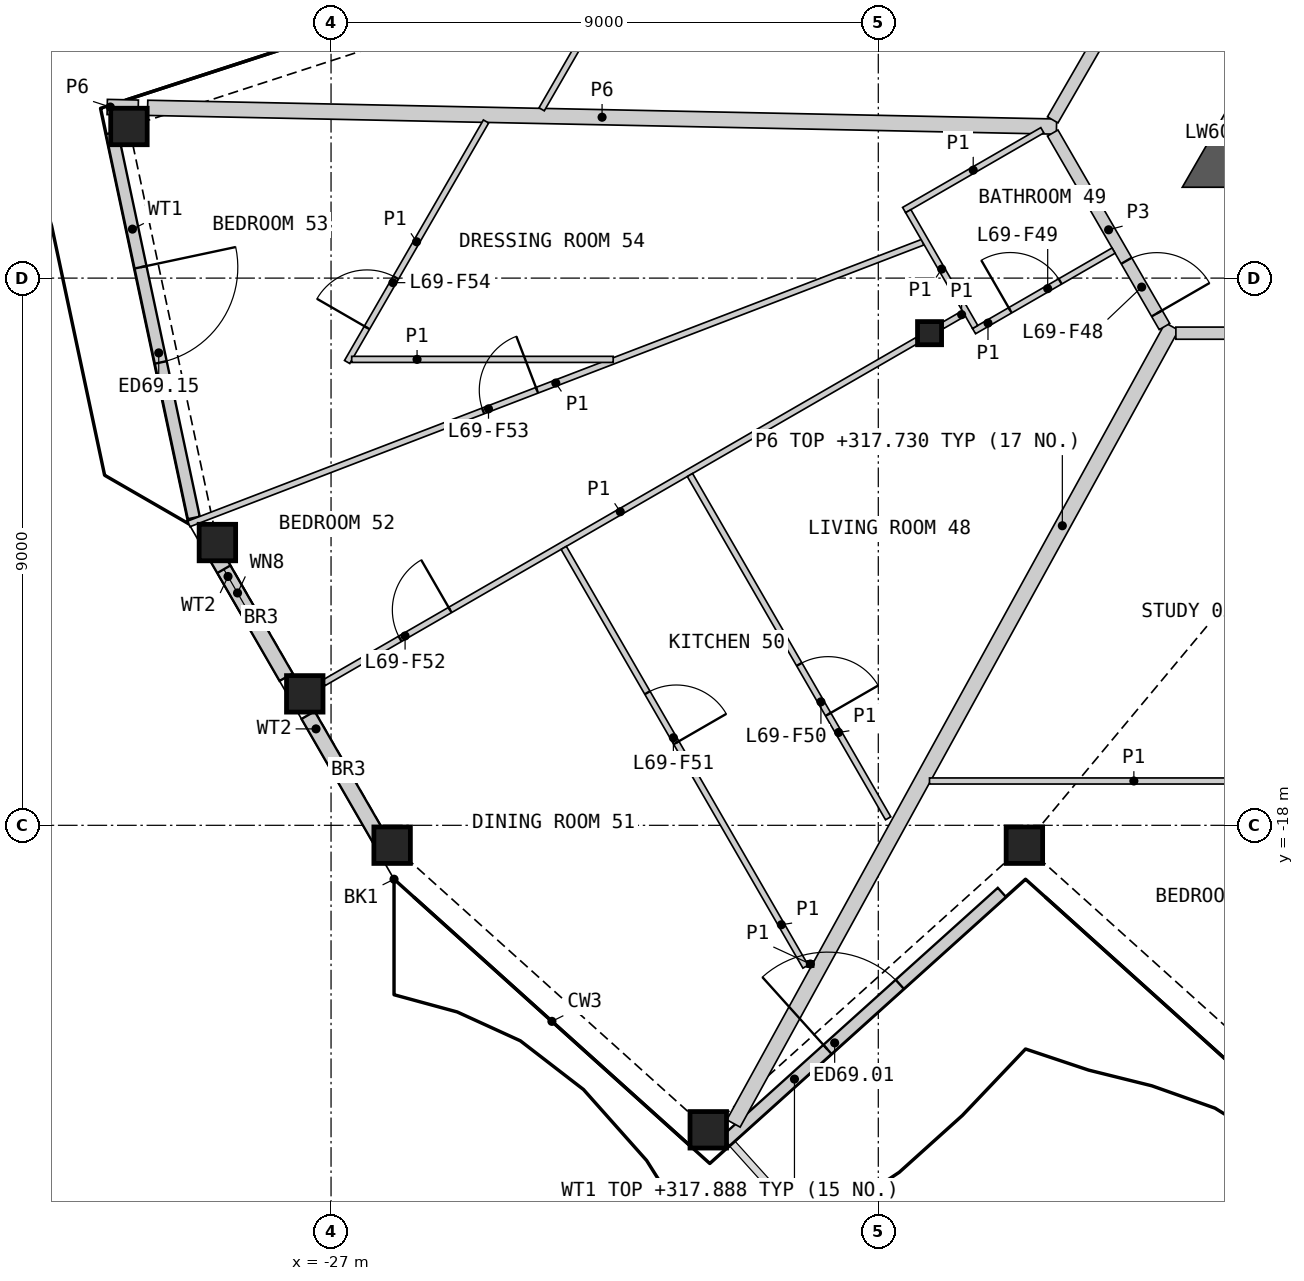
"""IFC4 building model, lengths in metres.
Left out: names, types, materials, properties, quantities, classifications, styles, units other than length and angle.
Written with IfcOpenShell. Run it as: python <this file> out.ifc"""

import sys

from ifc_helpers import new_model, si_unit, direction, frame, frame_2d, origin, origin_2d, place, context, subcontext, project, spatial, polyline, rectangle, hollow_rectangle, i_section, outline, extrude, element, fill, save


model = new_model("IFC4")
c1 = context("Model", 3, precision=1e-05, world=origin(), true_north=direction((0.0, 1.0)))
c2 = subcontext(c1, "Body", "Model", "MODEL_VIEW")
j1 = project(units=[si_unit("LENGTHUNIT", "METRE"), si_unit("PLANEANGLEUNIT", "RADIAN")], contexts=[c1])
p1 = place(None, origin())
s1 = spatial("IfcSite", under=j1, at=p1, CompositionType="ELEMENT")
p2 = place(p1, origin())
s2 = spatial("IfcBuilding", under=s1, at=p2, CompositionType="ELEMENT")
p3 = place(p2, frame((0.0, 0.0, 315.4)))
s3 = spatial("IfcBuildingStorey", under=s2, at=p3, CompositionType="ELEMENT", Elevation=315.4)
for number, where, z_axis, x_axis in (
    (1, (-25.995, -18.327, 0.0), (0.0, 0.0, 1.0), (1.0, 0.0, 0.0)),
    (2, (-20.796, -23.008, 0.0), (0.0, 0.0, 1.0), (1.0, 0.0, 0.0)),
    (3, (-15.597, -18.327, 0.0), (0.0, 0.0, 1.0), (1.0, 0.0, 0.0)),
    (4, (-30.324, -6.506, 0.0), (0.0, 0.0, 1.0), (1.0, 0.0, 0.0)),
    (5, (-28.869, -13.349, 0.0), (0.0, 0.0, 1.0), (1.0, 0.0, 0.0)),
    (6, (-27.432, -15.838, 0.0), (0.0, 0.0, 1.0), (1.0, 0.0, 0.0)),
):
    element("IfcColumn", number, at=place(p3, frame(where, z_axis=z_axis, x_axis=x_axis)), inside=s3, PredefinedType="COLUMN", context=c2, shape_type="SweptSolid", body=[
        extrude(hollow_rectangle(XDim=0.6, YDim=0.6, WallThickness=0.04, at=origin_2d()), origin(), (0.0, 0.0, 1.0), 3.4),
    ])
p4 = place(p3, frame((-17.157, -9.906, 0.0), z_axis=(0.0, 0.0, 1.0), x_axis=(1.0, 0.0, 0.0)))
e7 = element("IfcColumn", 7, at=p4, inside=s3, PredefinedType="COLUMN", context=c2, shape_type="SweptSolid", body=[
    extrude(i_section(OverallWidth=0.396, OverallDepth=0.381, WebThickness=0.019, FlangeThickness=0.03, at=origin_2d()), origin(), (0.0, 0.0, 1.0), 3.4),
])
p5 = place(p3, frame((-20.516, -23.198, 0.0), z_axis=(0.0, 0.0, 1.0), x_axis=(0.743121537674, 0.66915646918, 0.0)))
e8 = element("IfcWall", 8, at=p5, inside=s3, PredefinedType="SOLIDWALL", context=c2, shape_type="SweptSolid", body=[
    extrude(rectangle(XDim=6.12, YDim=0.2, at=frame_2d((3.06, 0.0))), origin(), (0.0, 0.0, 1.0), 2.488),
])
p6 = place(p5, frame((2.26, 0.0, 0.0)))
e9 = element("IfcOpeningElement", 9, at=p6, cuts=e8, PredefinedType="OPENING", context=c2, shape_type="SweptSolid", body=[
    extrude(rectangle(XDim=1.6, YDim=2.25, at=frame_2d((0.8, 1.125))), frame((0.0, 0.11, 0.0), z_axis=(0.0, -1.0, 0.0), x_axis=(1.0, 0.0, 0.0)), (0.0, 0.0, 1.0), 0.22),
])
p7 = place(p3, frame((-30.603, -6.611, 0.0), z_axis=(0.0, 0.0, 1.0), x_axis=(0.207921893309, -0.978145432072, 0.0)))
e10 = element("IfcWall", 10, at=p7, inside=s3, PredefinedType="SOLIDWALL", context=c2, shape_type="SweptSolid", body=[
    extrude(rectangle(XDim=6.475, YDim=0.2, at=frame_2d((3.237, 0.0))), origin(), (0.0, 0.0, 1.0), 2.488),
])
p8 = place(p7, frame((2.26, 0.0, 0.0)))
e11 = element("IfcOpeningElement", 11, at=p8, cuts=e10, PredefinedType="OPENING", context=c2, shape_type="SweptSolid", body=[
    extrude(rectangle(XDim=1.6, YDim=2.25, at=frame_2d((0.8, 1.125))), frame((0.0, 0.11, 0.0), z_axis=(0.0, -1.0, 0.0), x_axis=(1.0, 0.0, 0.0)), (0.0, 0.0, 1.0), 0.22),
])
p9 = place(p3, frame((-29.013, -13.356, 0.0), z_axis=(0.0, 0.0, 1.0), x_axis=(0.500012659481, -0.866018094706, 0.0)))
e12 = element("IfcWall", 12, at=p9, inside=s3, PredefinedType="SOLIDWALL", context=c2, shape_type="SweptSolid", body=[
    extrude(rectangle(XDim=2.549, YDim=0.25, at=frame_2d((1.274, 0.0))), origin(), (0.0, 0.0, 1.0), 2.488),
])
p10 = place(p9, frame((0.5, 0.0, 1.5)))
e13 = element("IfcOpeningElement", 13, at=p10, cuts=e12, PredefinedType="OPENING", context=c2, shape_type="SweptSolid", body=[
    extrude(rectangle(XDim=0.9, YDim=0.7, at=frame_2d((0.45, 0.35))), frame((0.0, 0.135, 0.0), z_axis=(0.0, -1.0, 0.0), x_axis=(1.0, 0.0, 0.0)), (0.0, 0.0, 1.0), 0.27),
])
p11 = place(p3, frame((-27.378, -16.188, 0.0), z_axis=(0.0, 0.0, 1.0), x_axis=(0.499992367345, -0.866029810455, 0.0)))
e14 = element("IfcWall", 14, at=p11, inside=s3, PredefinedType="SOLIDWALL", context=c2, shape_type="SweptSolid", body=[
    extrude(rectangle(XDim=2.61, YDim=0.25, at=frame_2d((1.305, 0.0))), origin(), (0.0, 0.0, 1.0), 2.488),
])
p12 = place(p3, origin())
e15 = element("IfcWall", 15, at=p12, inside=s3, PredefinedType="SHEAR", context=c2, shape_type="SweptSolid", body=[
    extrude(outline(polyline([(-12.48, -6.606), (-11.961, -6.906), (-11.961, -7.506), (-13.0, -7.506), (-12.48, -6.606)])), origin(), (0.0, 0.0, 1.0), 3.1),
])
p13 = place(p3, frame((-10.925, -4.511, 0.0), z_axis=(0.0, 0.0, 1.0), x_axis=(-0.500018667571, -0.866014625789, 0.0)))
e16 = element("IfcWall", 16, at=p13, inside=s3, PredefinedType="SHEAR", context=c2, shape_type="SweptSolid", body=[
    extrude(rectangle(XDim=2.592, YDim=0.6, at=frame_2d((1.296, 0.0))), origin(), (0.0, 0.0, 1.0), 3.1),
])
p14 = place(p13, frame((0.6, 0.0, 0.0)))
e17 = element("IfcOpeningElement", 17, at=p14, cuts=e16, PredefinedType="OPENING", context=c2, shape_type="SweptSolid", body=[
    extrude(rectangle(XDim=1.0, YDim=2.1, at=frame_2d((0.5, 1.05))), frame((0.0, 0.31, 0.0), z_axis=(0.0, -1.0, 0.0), x_axis=(1.0, 0.0, 0.0)), (0.0, 0.0, 1.0), 0.62),
])
p15 = place(p3, frame((-20.381, -22.904, 0.0), z_axis=(0.0, 0.0, 1.0), x_axis=(0.481994550341, 0.876174214093, 0.0)))
e18 = element("IfcWall", 18, at=p15, inside=s3, PredefinedType="PARTITIONING", context=c2, shape_type="SweptSolid", body=[
    extrude(rectangle(XDim=14.96, YDim=0.25, at=frame_2d((7.48, 0.0))), origin(), (0.0, 0.0, 1.0), 2.33),
])
p16 = place(p3, frame((-30.016, -6.199, 0.0), z_axis=(0.0, 0.0, 1.0), x_axis=(0.999786619639, -0.02065708573, 0.0)))
e19 = element("IfcWall", 19, at=p16, inside=s3, PredefinedType="PARTITIONING", context=c2, shape_type="SweptSolid", body=[
    extrude(rectangle(XDim=14.951, YDim=0.25, at=frame_2d((7.475, 0.0))), origin(), (0.0, 0.0, 1.0), 2.33),
])
p17 = place(p3, frame((-13.106, -9.906, 0.0), z_axis=(0.0, 0.0, 1.0), x_axis=(1.0, 0.0, 0.0)))
e20 = element("IfcWall", 20, at=p17, inside=s3, PredefinedType="PARTITIONING", context=c2, shape_type="SweptSolid", body=[
    extrude(rectangle(XDim=4.32, YDim=0.2, at=frame_2d((2.16, 0.0))), origin(), (0.0, 0.0, 1.0), 3.1),
])
p18 = place(p3, frame((-15.131, -6.397, 0.0), z_axis=(0.0, 0.0, 1.0), x_axis=(0.500003406062, 0.866023437285, 0.0)))
e21 = element("IfcWall", 21, at=p18, inside=s3, PredefinedType="PARTITIONING", context=c2, shape_type="SweptSolid", body=[
    extrude(rectangle(XDim=4.288, YDim=0.2, at=frame_2d((2.144, 0.0))), origin(), (0.0, 0.0, 1.0), 3.1),
])
p19 = place(p3, frame((-15.131, -6.614, 0.0), z_axis=(0.0, 0.0, 1.0), x_axis=(0.499967746641, -0.866044024469, 0.0)))
e22 = element("IfcWall", 22, at=p19, inside=s3, PredefinedType="PARTITIONING", context=c2, shape_type="SweptSolid", body=[
    extrude(rectangle(XDim=3.676, YDim=0.2, at=frame_2d((1.838, 0.0))), origin(), (0.0, 0.0, 1.0), 3.1),
])
p20 = place(p19, frame((2.426, 0.0, 0.0)))
e23 = element("IfcOpeningElement", 23, at=p20, cuts=e22, PredefinedType="OPENING", context=c2, shape_type="SweptSolid", body=[
    extrude(rectangle(XDim=1.0, YDim=2.1, at=frame_2d((0.5, 1.05))), frame((0.0, 0.11, 0.0), z_axis=(0.0, -1.0, 0.0), x_axis=(1.0, 0.0, 0.0)), (0.0, 0.0, 1.0), 0.22),
])
p21 = place(p3, frame((-30.681, -6.186, 0.0), z_axis=(0.0, 0.0, 1.0), x_axis=(0.999788216533, -0.020579652135, 0.0)))
e24 = element("IfcWall", 24, at=p21, inside=s3, PredefinedType="PARTITIONING", context=c2, shape_type="SweptSolid", body=[
    extrude(rectangle(XDim=0.51, YDim=0.25, at=frame_2d((0.255, 0.0))), origin(), (0.0, 0.0, 1.0), 2.33),
])
p22 = place(p3, frame((-29.338, -13.042, 0.0), z_axis=(0.0, 0.0, 1.0), x_axis=(0.93358243931, 0.358362705944, 0.0)))
e25 = element("IfcWall", 25, at=p22, inside=s3, PredefinedType="PARTITIONING", context=c2, shape_type="SweptSolid", body=[
    extrude(rectangle(XDim=12.928, YDim=0.1, at=frame_2d((6.464, 0.0))), origin(), (0.0, 0.0, 1.0), 2.33),
])
p23 = place(p22, frame((5.183, 0.0, 0.0)))
e26 = element("IfcOpeningElement", 26, at=p23, cuts=e25, PredefinedType="OPENING", context=c2, shape_type="SweptSolid", body=[
    extrude(rectangle(XDim=0.95, YDim=2.1, at=frame_2d((0.475, 1.05))), frame((0.0, 0.06, 0.0), z_axis=(0.0, -1.0, 0.0), x_axis=(1.0, 0.0, 0.0)), (0.0, 0.0, 1.0), 0.12),
])
p24 = place(p3, frame((-27.122, -15.659, 0.0), z_axis=(0.0, 0.0, 1.0), x_axis=(0.866021046153, 0.500007547564, 0.0)))
e27 = element("IfcWall", 27, at=p24, inside=s3, PredefinedType="PARTITIONING", context=c2, shape_type="SweptSolid", body=[
    extrude(rectangle(XDim=11.267, YDim=0.1, at=frame_2d((5.634, 0.0))), origin(), (0.0, 0.0, 1.0), 2.33),
])
p25 = place(p24, frame((1.452, 0.0, 0.0)))
e28 = element("IfcOpeningElement", 28, at=p25, cuts=e27, PredefinedType="OPENING", context=c2, shape_type="SweptSolid", body=[
    extrude(rectangle(XDim=0.95, YDim=2.1, at=frame_2d((0.475, 1.05))), frame((0.0, 0.06, 0.0), z_axis=(0.0, -1.0, 0.0), x_axis=(1.0, 0.0, 0.0)), (0.0, 0.0, 1.0), 0.12),
])
p26 = place(p3, frame((-23.173, -13.437, 0.0), z_axis=(0.0, 0.0, 1.0), x_axis=(0.500018284498, -0.866014846967, 0.0)))
e29 = element("IfcWall", 29, at=p26, inside=s3, PredefinedType="PARTITIONING", context=c2, shape_type="SweptSolid", body=[
    extrude(rectangle(XDim=7.953, YDim=0.1, at=frame_2d((3.977, 0.0))), origin(), (0.0, 0.0, 1.0), 2.33),
])
p27 = place(p26, frame((2.751, 0.0, 0.0)))
e30 = element("IfcOpeningElement", 30, at=p27, cuts=e29, PredefinedType="OPENING", context=c2, shape_type="SweptSolid", body=[
    extrude(rectangle(XDim=0.95, YDim=2.1, at=frame_2d((0.475, 1.05))), frame((0.0, 0.06, 0.0), z_axis=(0.0, -1.0, 0.0), x_axis=(1.0, 0.0, 0.0)), (0.0, 0.0, 1.0), 0.12),
])
p28 = place(p3, frame((-23.536, -6.224, 0.0), z_axis=(0.0, 0.0, 1.0), x_axis=(0.500002256251, 0.866024101133, 0.0)))
e31 = element("IfcWall", 31, at=p28, inside=s3, PredefinedType="PARTITIONING", context=c2, shape_type="SweptSolid", body=[
    extrude(rectangle(XDim=6.722, YDim=0.1, at=frame_2d((3.361, 0.0))), origin(), (0.0, 0.0, 1.0), 2.33),
])
p29 = place(p28, frame((3.292, 0.0, 0.0)))
e32 = element("IfcOpeningElement", 32, at=p29, cuts=e31, PredefinedType="OPENING", context=c2, shape_type="SweptSolid", body=[
    extrude(rectangle(XDim=0.95, YDim=2.1, at=frame_2d((0.475, 1.05))), frame((0.0, 0.06, 0.0), z_axis=(0.0, -1.0, 0.0), x_axis=(1.0, 0.0, 0.0)), (0.0, 0.0, 1.0), 0.12),
])
p30 = place(p3, frame((-17.158, -17.271, 0.0), z_axis=(0.0, 0.0, 1.0), x_axis=(1.0, 0.0, 0.0)))
e33 = element("IfcWall", 33, at=p30, inside=s3, PredefinedType="PARTITIONING", context=c2, shape_type="SweptSolid", body=[
    extrude(rectangle(XDim=6.722, YDim=0.1, at=frame_2d((3.361, 0.0))), origin(), (0.0, 0.0, 1.0), 2.33),
])
p31 = place(p30, frame((5.015, 0.0, 0.0)))
e34 = element("IfcOpeningElement", 34, at=p31, cuts=e33, PredefinedType="OPENING", context=c2, shape_type="SweptSolid", body=[
    extrude(rectangle(XDim=0.95, YDim=2.1, at=frame_2d((0.475, 1.05))), frame((0.0, 0.06, 0.0), z_axis=(0.0, -1.0, 0.0), x_axis=(1.0, 0.0, 0.0)), (0.0, 0.0, 1.0), 0.12),
])
p32 = place(p3, frame((-21.098, -12.239, 0.0), z_axis=(0.0, 0.0, 1.0), x_axis=(0.499973122483, -0.86604092097, 0.0)))
e35 = element("IfcWall", 35, at=p32, inside=s3, PredefinedType="PARTITIONING", context=c2, shape_type="SweptSolid", body=[
    extrude(rectangle(XDim=6.52, YDim=0.1, at=frame_2d((3.26, 0.0))), origin(), (0.0, 0.0, 1.0), 2.33),
])
p33 = place(p32, frame((3.596, 0.0, 0.0)))
e36 = element("IfcOpeningElement", 36, at=p33, cuts=e35, PredefinedType="OPENING", context=c2, shape_type="SweptSolid", body=[
    extrude(rectangle(XDim=0.95, YDim=2.1, at=frame_2d((0.475, 1.05))), frame((0.0, 0.06, 0.0), z_axis=(0.0, -1.0, 0.0), x_axis=(1.0, 0.0, 0.0)), (0.0, 0.0, 1.0), 0.12),
])
p34 = place(p3, frame((-26.736, -10.38, 0.0), z_axis=(0.0, 0.0, 1.0), x_axis=(0.500024700597, 0.866011142419, 0.0)))
e37 = element("IfcWall", 37, at=p34, inside=s3, PredefinedType="PARTITIONING", context=c2, shape_type="SweptSolid", body=[
    extrude(rectangle(XDim=4.568, YDim=0.1, at=frame_2d((2.284, 0.0))), origin(), (0.0, 0.0, 1.0), 2.33),
])
p35 = place(p34, frame((0.652, 0.0, 0.0)))
e38 = element("IfcOpeningElement", 38, at=p35, cuts=e37, PredefinedType="OPENING", context=c2, shape_type="SweptSolid", body=[
    extrude(rectangle(XDim=0.95, YDim=2.1, at=frame_2d((0.475, 1.05))), frame((0.0, 0.06, 0.0), z_axis=(0.0, -1.0, 0.0), x_axis=(1.0, 0.0, 0.0)), (0.0, 0.0, 1.0), 0.12),
])
p36 = place(p3, frame((-26.66, -10.337, 0.0), z_axis=(0.0, 0.0, 1.0), x_axis=(1.0, 0.0, 0.0)))
e39 = element("IfcWall", 39, at=p36, inside=s3, PredefinedType="PARTITIONING", context=c2, shape_type="SweptSolid", body=[
    extrude(rectangle(XDim=4.301, YDim=0.1, at=frame_2d((2.15, 0.0))), origin(), (0.0, 0.0, 1.0), 2.33),
])
p37 = place(p3, frame((-17.575, -7.881, 0.0), z_axis=(0.0, 0.0, 1.0), x_axis=(0.866013657776, 0.500020344131, 0.0)))
e40 = element("IfcWall", 40, at=p37, inside=s3, PredefinedType="PARTITIONING", context=c2, shape_type="SweptSolid", body=[
    extrude(rectangle(XDim=2.625, YDim=0.1, at=frame_2d((1.312, 0.0))), origin(), (0.0, 0.0, 1.0), 2.33),
])
p38 = place(p3, frame((-16.426, -9.872, 0.0), z_axis=(0.0, 0.0, 1.0), x_axis=(0.866029095148, 0.499993606316, 0.0)))
e41 = element("IfcWall", 41, at=p38, inside=s3, PredefinedType="PARTITIONING", context=c2, shape_type="SweptSolid", body=[
    extrude(rectangle(XDim=2.65, YDim=0.1, at=frame_2d((1.325, 0.0))), origin(), (0.0, 0.0, 1.0), 2.33),
])
p39 = place(p38, frame((0.686, 0.0, 0.0)))
e42 = element("IfcOpeningElement", 42, at=p39, cuts=e41, PredefinedType="OPENING", context=c2, shape_type="SweptSolid", body=[
    extrude(rectangle(XDim=0.95, YDim=2.1, at=frame_2d((0.475, 1.05))), frame((0.0, 0.06, 0.0), z_axis=(0.0, -1.0, 0.0), x_axis=(1.0, 0.0, 0.0)), (0.0, 0.0, 1.0), 0.12),
])
p40 = place(p3, frame((-17.507, -7.899, 0.0), z_axis=(0.0, 0.0, 1.0), x_axis=(0.499946605688, -0.86605622881, 0.0)))
e43 = element("IfcWall", 43, at=p40, inside=s3, PredefinedType="PARTITIONING", context=c2, shape_type="SweptSolid", body=[
    extrude(rectangle(XDim=2.2, YDim=0.1, at=frame_2d((1.1, 0.0))), origin(), (0.0, 0.0, 1.0), 2.33),
])
p41 = place(p3, frame((-16.949, -9.786, 0.0), z_axis=(0.0, 0.0, 1.0), x_axis=(0.866036909293, 0.499980071345, 0.0)))
e44 = element("IfcWall", 44, at=p41, inside=s3, PredefinedType="PARTITIONING", context=c2, shape_type="SweptSolid", body=[
    extrude(rectangle(XDim=0.41, YDim=0.1, at=frame_2d((0.205, 0.0))), origin(), (0.0, 0.0, 1.0), 2.33),
])
p42 = place(p3, frame((-19.171, -20.281, 0.0), z_axis=(0.0, 0.0, 1.0), x_axis=(1.0, 0.0, 0.0)))
e45 = element("IfcWall", 45, at=p42, inside=s3, PredefinedType="PARTITIONING", context=c2, shape_type="SweptSolid", body=[
    extrude(rectangle(XDim=0.108, YDim=0.1, at=frame_2d((0.054, 0.0))), origin(), (0.0, 0.0, 1.0), 2.33),
])
p43 = place(p6, origin())
e46 = element("IfcDoor", 46, at=p43, inside=s3, OperationType="DOUBLE_DOOR_SINGLE_SWING", PredefinedType="DOOR", context=c2, shape_type="SweptSolid", body=[
    extrude(rectangle(XDim=1.6, YDim=2.25, at=frame_2d((0.8, 1.125))), frame((0.0, 0.025, 0.0), z_axis=(0.0, -1.0, 0.0), x_axis=(1.0, 0.0, 0.0)), (0.0, 0.0, 1.0), 0.05),
])
fill(e9, e46)
p44 = place(p8, origin())
e47 = element("IfcDoor", 47, at=p44, inside=s3, OperationType="DOUBLE_DOOR_SINGLE_SWING", PredefinedType="DOOR", context=c2, shape_type="SweptSolid", body=[
    extrude(rectangle(XDim=1.6, YDim=2.25, at=frame_2d((0.8, 1.125))), frame((0.0, 0.025, 0.0), z_axis=(0.0, -1.0, 0.0), x_axis=(1.0, 0.0, 0.0)), (0.0, 0.0, 1.0), 0.05),
])
fill(e11, e47)
p45 = place(p10, origin())
e48 = element("IfcWindow", 48, at=p45, inside=s3, PartitioningType="SINGLE_PANEL", PredefinedType="WINDOW", context=c2, shape_type="SweptSolid", body=[
    extrude(rectangle(XDim=0.9, YDim=0.7, at=frame_2d((0.45, 0.35))), frame((0.0, 0.03, 0.0), z_axis=(0.0, -1.0, 0.0), x_axis=(1.0, 0.0, 0.0)), (0.0, 0.0, 1.0), 0.06),
])
fill(e13, e48)
p46 = place(p20, origin())
e49 = element("IfcDoor", 49, at=p46, inside=s3, OperationType="SINGLE_SWING_RIGHT", PredefinedType="DOOR", context=c2, shape_type="SweptSolid", body=[
    extrude(rectangle(XDim=1.0, YDim=2.1, at=frame_2d((0.5, 1.05))), frame((0.0, 0.025, 0.0), z_axis=(0.0, -1.0, 0.0), x_axis=(1.0, 0.0, 0.0)), (0.0, 0.0, 1.0), 0.05),
])
fill(e23, e49)
p47 = place(p39, origin())
e50 = element("IfcDoor", 50, at=p47, inside=s3, OperationType="SINGLE_SWING_LEFT", PredefinedType="DOOR", context=c2, shape_type="SweptSolid", body=[
    extrude(rectangle(XDim=0.95, YDim=2.1, at=frame_2d((0.475, 1.05))), frame((0.0, 0.025, 0.0), z_axis=(0.0, -1.0, 0.0), x_axis=(1.0, 0.0, 0.0)), (0.0, 0.0, 1.0), 0.05),
])
fill(e42, e50)
p48 = place(p33, origin())
e51 = element("IfcDoor", 51, at=p48, inside=s3, OperationType="SINGLE_SWING_RIGHT", PredefinedType="DOOR", context=c2, shape_type="SweptSolid", body=[
    extrude(rectangle(XDim=0.95, YDim=2.1, at=frame_2d((0.475, 1.05))), frame((0.0, 0.025, 0.0), z_axis=(0.0, -1.0, 0.0), x_axis=(1.0, 0.0, 0.0)), (0.0, 0.0, 1.0), 0.05),
])
fill(e36, e51)
p49 = place(p27, origin())
e52 = element("IfcDoor", 52, at=p49, inside=s3, OperationType="SINGLE_SWING_RIGHT", PredefinedType="DOOR", context=c2, shape_type="SweptSolid", body=[
    extrude(rectangle(XDim=0.95, YDim=2.1, at=frame_2d((0.475, 1.05))), frame((0.0, 0.025, 0.0), z_axis=(0.0, -1.0, 0.0), x_axis=(1.0, 0.0, 0.0)), (0.0, 0.0, 1.0), 0.05),
])
fill(e30, e52)
p50 = place(p25, origin())
e53 = element("IfcDoor", 53, at=p50, inside=s3, OperationType="SINGLE_SWING_RIGHT", PredefinedType="DOOR", context=c2, shape_type="SweptSolid", body=[
    extrude(rectangle(XDim=0.95, YDim=2.1, at=frame_2d((0.475, 1.05))), frame((0.0, 0.025, 0.0), z_axis=(0.0, -1.0, 0.0), x_axis=(1.0, 0.0, 0.0)), (0.0, 0.0, 1.0), 0.05),
])
fill(e28, e53)
p51 = place(p23, origin())
e54 = element("IfcDoor", 54, at=p51, inside=s3, OperationType="SINGLE_SWING_RIGHT", PredefinedType="DOOR", context=c2, shape_type="SweptSolid", body=[
    extrude(rectangle(XDim=0.95, YDim=2.1, at=frame_2d((0.475, 1.05))), frame((0.0, 0.025, 0.0), z_axis=(0.0, -1.0, 0.0), x_axis=(1.0, 0.0, 0.0)), (0.0, 0.0, 1.0), 0.05),
])
fill(e26, e54)
p52 = place(p35, origin())
e55 = element("IfcDoor", 55, at=p52, inside=s3, OperationType="SINGLE_SWING_LEFT", PredefinedType="DOOR", context=c2, shape_type="SweptSolid", body=[
    extrude(rectangle(XDim=0.95, YDim=2.1, at=frame_2d((0.475, 1.05))), frame((0.0, 0.025, 0.0), z_axis=(0.0, -1.0, 0.0), x_axis=(1.0, 0.0, 0.0)), (0.0, 0.0, 1.0), 0.05),
])
fill(e38, e55)
save(model, sys.argv[1])
